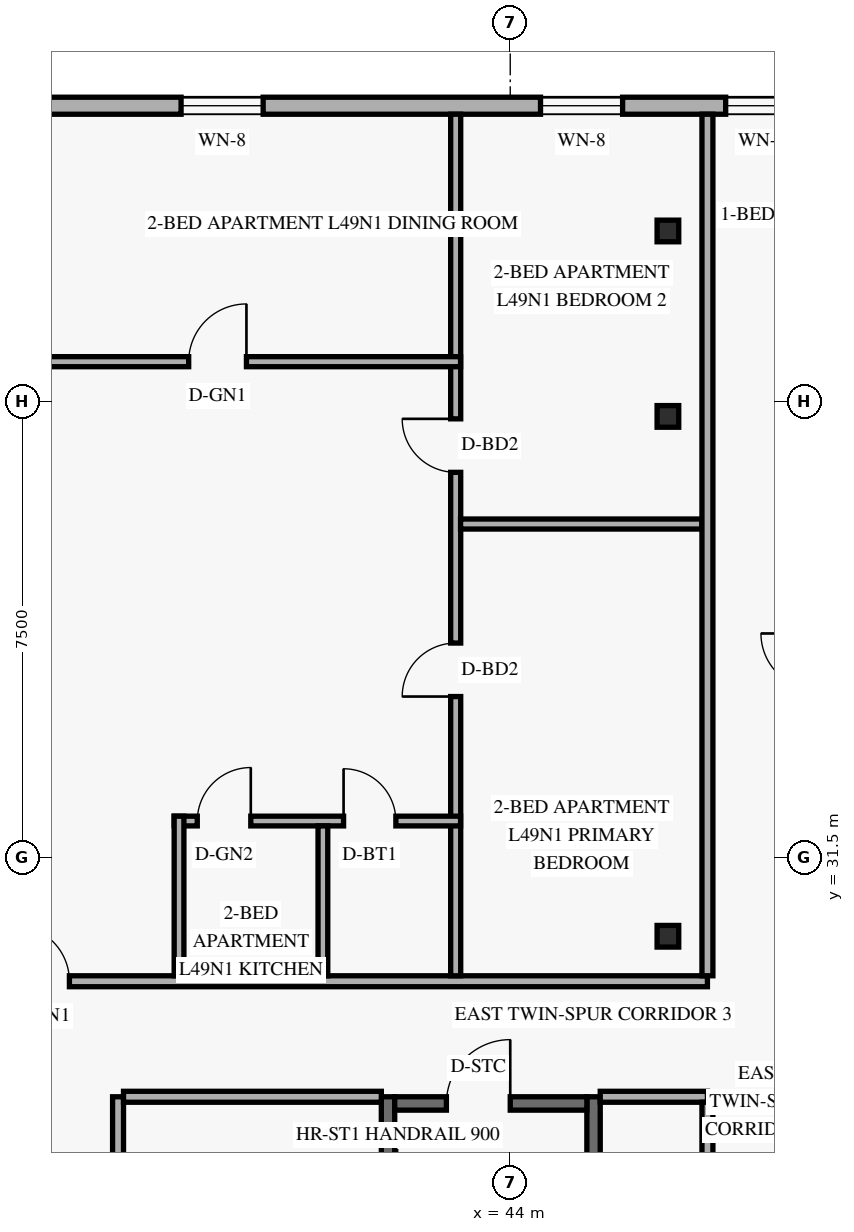
"""IFC4 building model, lengths in metres.
Left out: names, types, materials, properties, quantities, classifications, styles, units other than length and angle.
Written with IfcOpenShell. Run it as: python <this file> out.ifc"""

import sys

from ifc_helpers import new_model, si_unit, direction, frame, frame_2d, origin, origin_2d, place, context, subcontext, project, spatial, rectangle, hollow_rectangle, extrude, element, fill, save


model = new_model("IFC4")
c1 = context("Model", 3, precision=1e-05, world=origin(), true_north=direction((0.0, 1.0)))
c2 = subcontext(c1, "Body", "Model", "MODEL_VIEW")
j1 = project(units=[si_unit("LENGTHUNIT", "METRE"), si_unit("PLANEANGLEUNIT", "RADIAN")], contexts=[c1])
p1 = place(None, origin())
s1 = spatial("IfcSite", under=j1, at=p1, CompositionType="ELEMENT")
p2 = place(p1, origin())
s2 = spatial("IfcBuilding", under=s1, at=p2, CompositionType="ELEMENT")
p3 = place(p2, frame((0.0, 0.0, 188.4)))
s3 = spatial("IfcBuildingStorey", under=s2, at=p3, CompositionType="ELEMENT", Elevation=188.4)
for number, where, z_axis, x_axis in (
    (1, (41.99, 19.58, 0.0), (0.0, 0.0, 1.0), (0.0, 1.0, 0.0)),
    (2, (45.37, 19.58, 0.0), (0.0, 0.0, 1.0), (0.0, 1.0, 0.0)),
):
    element("IfcWall", number, at=place(p3, frame(where, z_axis=z_axis, x_axis=x_axis)), inside=s3, PredefinedType="SHEAR", context=c2, shape_type="SweptSolid", body=[
        extrude(rectangle(XDim=7.98, YDim=0.22, at=frame_2d((3.99, 0.0))), origin(), (0.0, 0.0, 1.0), 2.739),
    ])
p4 = place(p3, frame((42.1, 27.45, 0.0), z_axis=(0.0, 0.0, 1.0), x_axis=(1.0, 0.0, 0.0)))
e3 = element("IfcWall", 3, at=p4, inside=s3, PredefinedType="SHEAR", context=c2, shape_type="SweptSolid", body=[
    extrude(rectangle(XDim=3.16, YDim=0.22, at=frame_2d((1.58, 0.0))), origin(), (0.0, 0.0, 1.0), 2.739),
])
p5 = place(p4, frame((0.85, 0.0, 0.0)))
e4 = element("IfcOpeningElement", 4, at=p5, cuts=e3, PredefinedType="OPENING", context=c2, shape_type="SweptSolid", body=[
    extrude(rectangle(XDim=1.05, YDim=2.15, at=frame_2d((0.525, 1.075))), frame((0.0, 0.12, 0.0), z_axis=(0.0, -1.0, 0.0), x_axis=(1.0, 0.0, 0.0)), (0.0, 0.0, 1.0), 0.24),
])
for number, where, z_axis, x_axis in (
    (5, (46.53, 30.2, 0.0), (0.035, 0.0, 0.999), (0.0, 1.0, 0.0)),
    (6, (46.53, 38.75, 0.0), (0.035, 0.0, 0.999), (0.0, 1.0, 0.0)),
    (7, (46.53, 41.8, 0.0), (0.035, 0.0, 0.999), (0.0, 1.0, 0.0)),
):
    element("IfcColumn", number, at=place(p3, frame(where, z_axis=z_axis, x_axis=x_axis)), inside=s3, PredefinedType="COLUMN", context=c2, shape_type="SweptSolid", body=[
        extrude(hollow_rectangle(XDim=0.356, YDim=0.356, WallThickness=0.016, at=origin_2d()), origin(), (0.0, 0.0, 1.0), 3.602),
    ])
p6 = place(p3, frame((54.98, 43.86, 0.0), z_axis=(0.0, 0.0, 1.0), x_axis=(-1.0, 0.0, 0.0)))
e8 = element("IfcWall", 8, at=p6, inside=s3, PredefinedType="SOLIDWALL", context=c2, shape_type="SweptSolid", body=[
    extrude(rectangle(XDim=33.76, YDim=0.28, at=frame_2d((16.88, 0.0))), origin(), (0.0, 0.0, 1.0), 3.35),
])
p7 = place(p6, frame((28.705, 0.0, 0.85)))
e9 = element("IfcOpeningElement", 9, at=p7, cuts=e8, PredefinedType="OPENING", context=c2, shape_type="SweptSolid", body=[
    extrude(rectangle(XDim=1.35, YDim=1.55, at=frame_2d((0.675, 0.775))), frame((0.0, 0.15, 0.0), z_axis=(0.0, -1.0, 0.0), x_axis=(1.0, 0.0, 0.0)), (0.0, 0.0, 1.0), 0.3),
])
p8 = place(p6, frame((21.82, 0.0, 0.85)))
e10 = element("IfcOpeningElement", 10, at=p8, cuts=e8, PredefinedType="OPENING", context=c2, shape_type="SweptSolid", body=[
    extrude(rectangle(XDim=1.35, YDim=1.55, at=frame_2d((0.675, 0.775))), frame((0.0, 0.15, 0.0), z_axis=(0.0, -1.0, 0.0), x_axis=(1.0, 0.0, 0.0)), (0.0, 0.0, 1.0), 0.3),
])
p9 = place(p6, frame((15.043, 0.0, 0.85)))
e11 = element("IfcOpeningElement", 11, at=p9, cuts=e8, PredefinedType="OPENING", context=c2, shape_type="SweptSolid", body=[
    extrude(rectangle(XDim=1.35, YDim=1.55, at=frame_2d((0.675, 0.775))), frame((0.0, 0.15, 0.0), z_axis=(0.0, -1.0, 0.0), x_axis=(1.0, 0.0, 0.0)), (0.0, 0.0, 1.0), 0.3),
])
p10 = place(p6, frame((9.132, 0.0, 0.85)))
e12 = element("IfcOpeningElement", 12, at=p10, cuts=e8, PredefinedType="OPENING", context=c2, shape_type="SweptSolid", body=[
    extrude(rectangle(XDim=1.35, YDim=1.55, at=frame_2d((0.675, 0.775))), frame((0.0, 0.15, 0.0), z_axis=(0.0, -1.0, 0.0), x_axis=(1.0, 0.0, 0.0)), (0.0, 0.0, 1.0), 0.3),
])
p11 = place(p6, frame((6.237, 0.0, 0.85)))
e13 = element("IfcOpeningElement", 13, at=p11, cuts=e8, PredefinedType="OPENING", context=c2, shape_type="SweptSolid", body=[
    extrude(rectangle(XDim=1.2, YDim=1.5, at=frame_2d((0.6, 0.75))), frame((0.0, 0.15, 0.0), z_axis=(0.0, -1.0, 0.0), x_axis=(1.0, 0.0, 0.0)), (0.0, 0.0, 1.0), 0.3),
])
p12 = place(p6, frame((2.293, 0.0, 0.85)))
e14 = element("IfcOpeningElement", 14, at=p12, cuts=e8, PredefinedType="OPENING", context=c2, shape_type="SweptSolid", body=[
    extrude(rectangle(XDim=1.35, YDim=1.55, at=frame_2d((0.675, 0.775))), frame((0.0, 0.15, 0.0), z_axis=(0.0, -1.0, 0.0), x_axis=(1.0, 0.0, 0.0)), (0.0, 0.0, 1.0), 0.3),
])
p13 = place(p3, frame((37.55, 17.28, 0.0), z_axis=(0.0, 0.0, 1.0), x_axis=(0.0, 1.0, 0.0)))
e15 = element("IfcWall", 15, at=p13, inside=s3, PredefinedType="STANDARD", context=c2, shape_type="SweptSolid", body=[
    extrude(rectangle(XDim=10.28, YDim=0.18, at=frame_2d((5.14, 0.0))), origin(), (0.0, 0.0, 1.0), 2.72),
])
p14 = place(p13, frame((4.72, 0.0, 0.0)))
e16 = element("IfcOpeningElement", 16, at=p14, cuts=e15, PredefinedType="OPENING", context=c2, shape_type="SweptSolid", body=[
    extrude(rectangle(XDim=0.88, YDim=2.12, at=frame_2d((0.44, 1.06))), frame((0.0, 0.1, 0.0), z_axis=(0.0, -1.0, 0.0), x_axis=(1.0, 0.0, 0.0)), (0.0, 0.0, 1.0), 0.2),
])
p15 = place(p3, frame((37.64, 27.56, 0.0), z_axis=(0.0, 0.0, 1.0), x_axis=(1.0, 0.0, 0.0)))
e17 = element("IfcWall", 17, at=p15, inside=s3, PredefinedType="STANDARD", context=c2, shape_type="SweptSolid", body=[
    extrude(rectangle(XDim=4.24, YDim=0.18, at=frame_2d((2.12, 0.0))), origin(), (0.0, 0.0, 1.0), 2.72),
])
p16 = place(p3, frame((45.48, 27.56, 0.0), z_axis=(0.0, 0.0, 1.0), x_axis=(1.0, 0.0, 0.0)))
e18 = element("IfcWall", 18, at=p16, inside=s3, PredefinedType="STANDARD", context=c2, shape_type="SweptSolid", body=[
    extrude(rectangle(XDim=1.763, YDim=0.18, at=frame_2d((0.881, 0.0))), origin(), (0.0, 0.0, 1.0), 2.72),
])
p17 = place(p3, frame((35.51, 29.46, 0.0), z_axis=(0.0, 0.0, 1.0), x_axis=(1.0, 0.0, 0.0)))
e19 = element("IfcWall", 19, at=p17, inside=s3, PredefinedType="STANDARD", context=c2, shape_type="SweptSolid", body=[
    extrude(rectangle(XDim=11.733, YDim=0.18, at=frame_2d((5.866, 0.0))), origin(), (0.0, 0.0, 1.0), 2.72),
])
p18 = place(p17, frame((0.32, 0.0, 0.0)))
e20 = element("IfcOpeningElement", 20, at=p18, cuts=e19, PredefinedType="OPENING", context=c2, shape_type="SweptSolid", body=[
    extrude(rectangle(XDim=0.92, YDim=2.15, at=frame_2d((0.46, 1.075))), frame((0.0, 0.1, 0.0), z_axis=(0.0, -1.0, 0.0), x_axis=(1.0, 0.0, 0.0)), (0.0, 0.0, 1.0), 0.2),
])
p19 = place(p3, frame((43.103, 29.55, 0.0), z_axis=(0.0, 0.0, 1.0), x_axis=(0.0, 1.0, 0.0)))
e21 = element("IfcWall", 21, at=p19, inside=s3, PredefinedType="PARTITIONING", context=c2, shape_type="SweptSolid", body=[
    extrude(rectangle(XDim=14.17, YDim=0.165, at=frame_2d((7.085, 0.0))), origin(), (0.0, 0.0, 1.0), 2.72),
])
p20 = place(p19, frame((4.593, 0.0, 0.0)))
e22 = element("IfcOpeningElement", 22, at=p20, cuts=e21, PredefinedType="OPENING", context=c2, shape_type="SweptSolid", body=[
    extrude(rectangle(XDim=0.88, YDim=2.14, at=frame_2d((0.44, 1.07))), frame((0.0, 0.093, 0.0), z_axis=(0.0, -1.0, 0.0), x_axis=(1.0, 0.0, 0.0)), (0.0, 0.0, 1.0), 0.185),
])
p21 = place(p19, frame((8.28, 0.0, 0.0)))
e23 = element("IfcOpeningElement", 23, at=p21, cuts=e21, PredefinedType="OPENING", context=c2, shape_type="SweptSolid", body=[
    extrude(rectangle(XDim=0.88, YDim=2.14, at=frame_2d((0.44, 1.07))), frame((0.0, 0.093, 0.0), z_axis=(0.0, -1.0, 0.0), x_axis=(1.0, 0.0, 0.0)), (0.0, 0.0, 1.0), 0.185),
])
p22 = place(p3, frame((38.473, 32.095, 0.0), z_axis=(0.0, 0.0, 1.0), x_axis=(1.0, 0.0, 0.0)))
e24 = element("IfcWall", 24, at=p22, inside=s3, PredefinedType="PLUMBINGWALL", context=c2, shape_type="SweptSolid", body=[
    extrude(rectangle(XDim=4.71, YDim=0.16, at=frame_2d((2.355, 0.0))), origin(), (0.0, 0.0, 1.0), 3.35),
])
p23 = place(p22, frame((0.38, 0.0, 0.0)))
e25 = element("IfcOpeningElement", 25, at=p23, cuts=e24, PredefinedType="OPENING", context=c2, shape_type="SweptSolid", body=[
    extrude(rectangle(XDim=0.88, YDim=2.12, at=frame_2d((0.44, 1.06))), frame((0.0, 0.09, 0.0), z_axis=(0.0, -1.0, 0.0), x_axis=(1.0, 0.0, 0.0)), (0.0, 0.0, 1.0), 0.18),
])
p24 = place(p22, frame((2.786, 0.0, 0.0)))
e26 = element("IfcOpeningElement", 26, at=p24, cuts=e24, PredefinedType="OPENING", context=c2, shape_type="SweptSolid", body=[
    extrude(rectangle(XDim=0.86, YDim=2.12, at=frame_2d((0.43, 1.06))), frame((0.0, 0.09, 0.0), z_axis=(0.0, -1.0, 0.0), x_axis=(1.0, 0.0, 0.0)), (0.0, 0.0, 1.0), 0.18),
])
p25 = place(p3, frame((38.553, 29.55, 0.0), z_axis=(0.0, 0.0, 1.0), x_axis=(0.0, 1.0, 0.0)))
e27 = element("IfcWall", 27, at=p25, inside=s3, PredefinedType="PLUMBINGWALL", context=c2, shape_type="SweptSolid", body=[
    extrude(rectangle(XDim=2.625, YDim=0.16, at=frame_2d((1.312, 0.0))), origin(), (0.0, 0.0, 1.0), 2.72),
])
p26 = place(p3, frame((40.919, 29.55, 0.0), z_axis=(0.0, 0.0, 1.0), x_axis=(0.0, 1.0, 0.0)))
e28 = element("IfcWall", 28, at=p26, inside=s3, PredefinedType="PLUMBINGWALL", context=c2, shape_type="SweptSolid", body=[
    extrude(rectangle(XDim=2.465, YDim=0.16, at=frame_2d((1.232, 0.0))), origin(), (0.0, 0.0, 1.0), 2.72),
])
p27 = place(p3, frame((35.51, 39.65, 0.0), z_axis=(0.0, 0.0, 1.0), x_axis=(1.0, 0.0, 0.0)))
e29 = element("IfcWall", 29, at=p27, inside=s3, PredefinedType="PARTITIONING", context=c2, shape_type="SweptSolid", body=[
    extrude(rectangle(XDim=7.673, YDim=0.165, at=frame_2d((3.836, 0.0))), origin(), (0.0, 0.0, 1.0), 3.35),
])
p28 = place(p27, frame((3.201, 0.0, 0.0)))
e30 = element("IfcOpeningElement", 30, at=p28, cuts=e29, PredefinedType="OPENING", context=c2, shape_type="SweptSolid", body=[
    extrude(rectangle(XDim=0.95, YDim=2.15, at=frame_2d((0.475, 1.075))), frame((0.0, 0.093, 0.0), z_axis=(0.0, -1.0, 0.0), x_axis=(1.0, 0.0, 0.0)), (0.0, 0.0, 1.0), 0.185),
])
p29 = place(p3, frame((43.183, 36.98, 0.0), z_axis=(0.0, 0.0, 1.0), x_axis=(1.0, 0.0, 0.0)))
e31 = element("IfcWall", 31, at=p29, inside=s3, PredefinedType="PARTITIONING", context=c2, shape_type="SweptSolid", body=[
    extrude(rectangle(XDim=3.97, YDim=0.165, at=frame_2d((1.985, 0.0))), origin(), (0.0, 0.0, 1.0), 2.72),
])
p30 = place(p3, frame((47.243, 17.37, 0.0), z_axis=(0.0, 0.0, 1.0), x_axis=(0.0, 1.0, 0.0)))
e32 = element("IfcWall", 32, at=p30, inside=s3, PredefinedType="STANDARD", context=c2, shape_type="SweptSolid", body=[
    extrude(rectangle(XDim=10.1, YDim=0.18, at=frame_2d((5.05, 0.0))), origin(), (0.0, 0.0, 1.0), 2.72),
])
p31 = place(p3, frame((47.243, 29.55, 0.0), z_axis=(0.0, 0.0, 1.0), x_axis=(0.0, 1.0, 0.0)))
e33 = element("IfcWall", 33, at=p31, inside=s3, PredefinedType="STANDARD", context=c2, shape_type="SweptSolid", body=[
    extrude(rectangle(XDim=14.17, YDim=0.18, at=frame_2d((7.085, 0.0))), origin(), (0.0, 0.0, 1.0), 2.72),
])
p32 = place(p9, origin())
e34 = element("IfcWindow", 34, at=p32, inside=s3, PartitioningType="SINGLE_PANEL", PredefinedType="WINDOW", context=c2, shape_type="SweptSolid", body=[
    extrude(rectangle(XDim=1.35, YDim=1.55, at=frame_2d((0.675, 0.775))), frame((0.0, 0.03, 0.0), z_axis=(0.0, -1.0, 0.0), x_axis=(1.0, 0.0, 0.0)), (0.0, 0.0, 1.0), 0.06),
])
fill(e11, e34)
p33 = place(p10, origin())
e35 = element("IfcWindow", 35, at=p33, inside=s3, PartitioningType="SINGLE_PANEL", PredefinedType="WINDOW", context=c2, shape_type="SweptSolid", body=[
    extrude(rectangle(XDim=1.35, YDim=1.55, at=frame_2d((0.675, 0.775))), frame((0.0, 0.03, 0.0), z_axis=(0.0, -1.0, 0.0), x_axis=(1.0, 0.0, 0.0)), (0.0, 0.0, 1.0), 0.06),
])
fill(e12, e35)
p34 = place(p11, origin())
e36 = element("IfcWindow", 36, at=p34, inside=s3, PartitioningType="SINGLE_PANEL", PredefinedType="WINDOW", context=c2, shape_type="SweptSolid", body=[
    extrude(rectangle(XDim=1.2, YDim=1.5, at=frame_2d((0.6, 0.75))), frame((0.0, 0.03, 0.0), z_axis=(0.0, -1.0, 0.0), x_axis=(1.0, 0.0, 0.0)), (0.0, 0.0, 1.0), 0.06),
])
fill(e13, e36)
p35 = place(p5, frame((1.05, 0.0, 0.0), z_axis=(0.0, 0.0, 1.0), x_axis=(-1.0, 0.0, 0.0)))
e37 = element("IfcDoor", 37, at=p35, inside=s3, OperationType="SINGLE_SWING_LEFT", PredefinedType="DOOR", context=c2, shape_type="SweptSolid", body=[
    extrude(rectangle(XDim=1.05, YDim=2.15, at=frame_2d((0.525, 1.075))), frame((0.0, 0.025, 0.0), z_axis=(0.0, -1.0, 0.0), x_axis=(1.0, 0.0, 0.0)), (0.0, 0.0, 1.0), 0.05),
])
fill(e4, e37)
p36 = place(p28, origin())
e38 = element("IfcDoor", 38, at=p36, inside=s3, OperationType="SINGLE_SWING_RIGHT", PredefinedType="DOOR", context=c2, shape_type="SweptSolid", body=[
    extrude(rectangle(XDim=0.95, YDim=2.15, at=frame_2d((0.475, 1.075))), frame((0.0, 0.025, 0.0), z_axis=(0.0, -1.0, 0.0), x_axis=(1.0, 0.0, 0.0)), (0.0, 0.0, 1.0), 0.05),
])
fill(e30, e38)
p37 = place(p18, origin())
e39 = element("IfcDoor", 39, at=p37, inside=s3, OperationType="SINGLE_SWING_LEFT", PredefinedType="DOOR", context=c2, shape_type="SweptSolid", body=[
    extrude(rectangle(XDim=0.92, YDim=2.15, at=frame_2d((0.46, 1.075))), frame((0.0, 0.025, 0.0), z_axis=(0.0, -1.0, 0.0), x_axis=(1.0, 0.0, 0.0)), (0.0, 0.0, 1.0), 0.05),
])
fill(e20, e39)
p38 = place(p23, origin())
e40 = element("IfcDoor", 40, at=p38, inside=s3, OperationType="SINGLE_SWING_RIGHT", PredefinedType="DOOR", context=c2, shape_type="SweptSolid", body=[
    extrude(rectangle(XDim=0.88, YDim=2.12, at=frame_2d((0.44, 1.06))), frame((0.0, 0.025, 0.0), z_axis=(0.0, -1.0, 0.0), x_axis=(1.0, 0.0, 0.0)), (0.0, 0.0, 1.0), 0.05),
])
fill(e25, e40)
p39 = place(p24, origin())
e41 = element("IfcDoor", 41, at=p39, inside=s3, OperationType="SINGLE_SWING_LEFT", PredefinedType="DOOR", context=c2, shape_type="SweptSolid", body=[
    extrude(rectangle(XDim=0.86, YDim=2.12, at=frame_2d((0.43, 1.06))), frame((0.0, 0.025, 0.0), z_axis=(0.0, -1.0, 0.0), x_axis=(1.0, 0.0, 0.0)), (0.0, 0.0, 1.0), 0.05),
])
fill(e26, e41)
p40 = place(p20, origin())
e42 = element("IfcDoor", 42, at=p40, inside=s3, OperationType="SINGLE_SWING_LEFT", PredefinedType="DOOR", context=c2, shape_type="SweptSolid", body=[
    extrude(rectangle(XDim=0.88, YDim=2.14, at=frame_2d((0.44, 1.07))), frame((0.0, 0.025, 0.0), z_axis=(0.0, -1.0, 0.0), x_axis=(1.0, 0.0, 0.0)), (0.0, 0.0, 1.0), 0.05),
])
fill(e22, e42)
p41 = place(p21, origin())
e43 = element("IfcDoor", 43, at=p41, inside=s3, OperationType="SINGLE_SWING_RIGHT", PredefinedType="DOOR", context=c2, shape_type="SweptSolid", body=[
    extrude(rectangle(XDim=0.88, YDim=2.14, at=frame_2d((0.44, 1.07))), frame((0.0, 0.025, 0.0), z_axis=(0.0, -1.0, 0.0), x_axis=(1.0, 0.0, 0.0)), (0.0, 0.0, 1.0), 0.05),
])
fill(e23, e43)
save(model, sys.argv[1])
